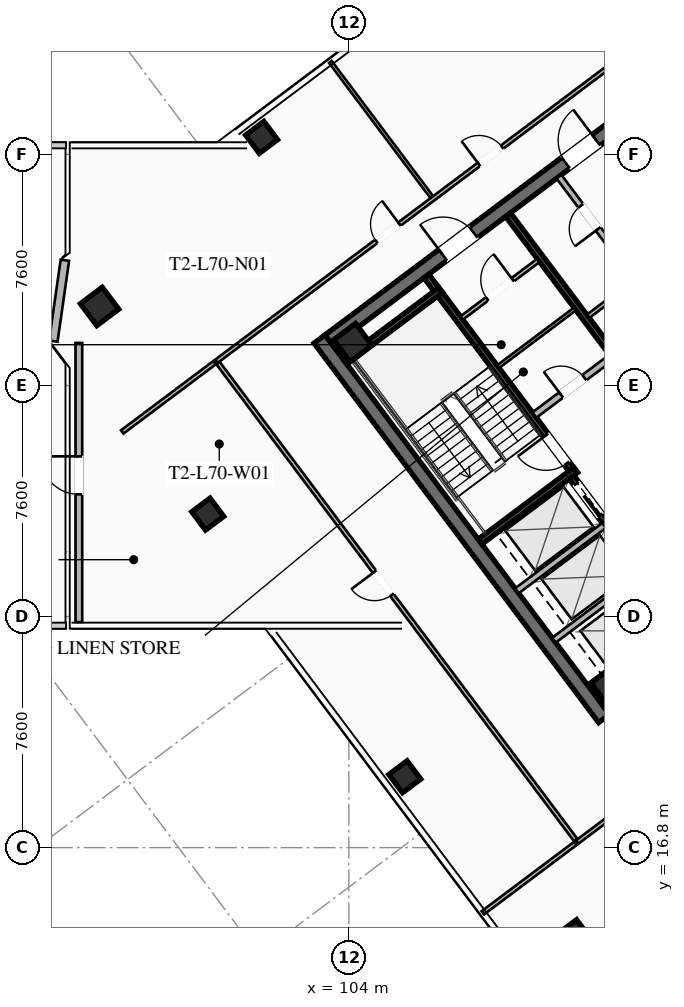
"""IFC4 building model, lengths in metres.
Left out: names, types, materials, properties, quantities, classifications, styles, units other than length and angle.
Written with IfcOpenShell. Run it as: python <this file> out.ifc"""

import sys

from ifc_helpers import new_model, si_unit, direction, frame, frame_2d, origin, origin_2d, place, context, subcontext, project, spatial, rectangle, hollow_rectangle, extrude, element, fill, save


model = new_model("IFC4")
c1 = context("Model", 3, precision=1e-05, world=origin(), true_north=direction((0.0, 1.0)))
c2 = subcontext(c1, "Body", "Model", "MODEL_VIEW")
j1 = project(units=[si_unit("LENGTHUNIT", "METRE"), si_unit("PLANEANGLEUNIT", "RADIAN")], contexts=[c1])
p1 = place(None, origin())
s1 = spatial("IfcSite", under=j1, at=p1, CompositionType="ELEMENT")
p2 = place(p1, origin())
s2 = spatial("IfcBuilding", under=s1, at=p2, CompositionType="ELEMENT")
p3 = place(p2, frame((0.0, 0.0, 259.4)))
s3 = spatial("IfcBuildingStorey", under=s2, at=p3, CompositionType="ELEMENT", Elevation=259.4)
p4 = place(p3, frame((112.396, 21.047, 0.0), z_axis=(0.0, 0.0, 1.0), x_axis=(-0.600005007985, 0.799996243986, 0.0)))
e1 = element("IfcWall", 1, at=p4, inside=s3, PredefinedType="SHEAR", context=c2, shape_type="SweptSolid", body=[
    extrude(rectangle(XDim=15.6, YDim=0.45, at=frame_2d((7.8, 0.0))), origin(), (0.0, 0.0, 1.0), 4.0),
])
p5 = place(p3, frame((124.649, 30.518, 0.0), z_axis=(0.0, 0.0, 1.0), x_axis=(-0.8, -0.6, 0.0)))
e2 = element("IfcWall", 2, at=p5, inside=s3, PredefinedType="SHEAR", context=c2, shape_type="SweptSolid", body=[
    extrude(rectangle(XDim=15.26, YDim=0.45, at=frame_2d((7.63, 0.0))), origin(), (0.0, 0.0, 1.0), 4.0),
])
p6 = place(p5, frame((9.33, 0.0, 0.0)))
e3 = element("IfcOpeningElement", 3, at=p6, cuts=e2, PredefinedType="OPENING", context=c2, shape_type="SweptSolid", body=[
    extrude(rectangle(XDim=1.25, YDim=2.25, at=frame_2d((0.625, 1.125))), frame((0.0, 0.235, 0.0), z_axis=(0.0, -1.0, 0.0), x_axis=(1.0, 0.0, 0.0)), (0.0, 0.0, 1.0), 0.47),
])
p7 = place(p5, frame((4.28, 0.0, 0.0)))
e4 = element("IfcOpeningElement", 4, at=p7, cuts=e2, PredefinedType="OPENING", context=c2, shape_type="SweptSolid", body=[
    extrude(rectangle(XDim=1.25, YDim=2.25, at=frame_2d((0.625, 1.125))), frame((0.0, 0.235, 0.0), z_axis=(0.0, -1.0, 0.0), x_axis=(1.0, 0.0, 0.0)), (0.0, 0.0, 1.0), 0.47),
])
p8 = place(p3, frame((103.351, 33.482, 0.0), z_axis=(0.0, 0.0, 1.0), x_axis=(0.8, 0.6, 0.0)))
e5 = element("IfcWall", 5, at=p8, inside=s3, PredefinedType="SHEAR", context=c2, shape_type="SweptSolid", body=[
    extrude(rectangle(XDim=15.26, YDim=0.45, at=frame_2d((7.63, 0.0))), origin(), (0.0, 0.0, 1.0), 4.0),
])
p9 = place(p8, frame((4.68, 0.0, 0.0)))
e6 = element("IfcOpeningElement", 6, at=p9, cuts=e5, PredefinedType="OPENING", context=c2, shape_type="SweptSolid", body=[
    extrude(rectangle(XDim=1.25, YDim=2.25, at=frame_2d((0.625, 1.125))), frame((0.0, 0.235, 0.0), z_axis=(0.0, -1.0, 0.0), x_axis=(1.0, 0.0, 0.0)), (0.0, 0.0, 1.0), 0.47),
])
p10 = place(p8, frame((9.73, 0.0, 0.0)))
e7 = element("IfcOpeningElement", 7, at=p10, cuts=e5, PredefinedType="OPENING", context=c2, shape_type="SweptSolid", body=[
    extrude(rectangle(XDim=1.25, YDim=2.25, at=frame_2d((0.625, 1.125))), frame((0.0, 0.235, 0.0), z_axis=(0.0, -1.0, 0.0), x_axis=(1.0, 0.0, 0.0)), (0.0, 0.0, 1.0), 0.47),
])
for number, where, z_axis, x_axis in (
    (8, (112.59, 22.13, 0.0), (0.0, 0.0, 1.0), (0.8, 0.6, 0.0)),
    (9, (104.13, 33.41, 0.0), (0.0, 0.0, 1.0), (0.8, 0.6, 0.0)),
    (10, (111.4, 13.8, 0.0), (0.0, 0.0, 1.0), (0.8, 0.6, 0.0)),
    (11, (95.8, 34.6, 0.0), (0.0, 0.0, 1.0), (0.8, 0.6, 0.0)),
):
    element("IfcColumn", number, at=place(p3, frame(where, z_axis=z_axis, x_axis=x_axis)), inside=s3, PredefinedType="COLUMN", context=c2, shape_type="SweptSolid", body=[
        extrude(hollow_rectangle(XDim=0.9, YDim=0.9, WallThickness=0.04, at=origin_2d()), origin(), (0.0, 0.0, 1.0), 3.7),
    ])
for number, where, z_axis, x_axis in (
    (12, (101.13, 40.16, 0.0), (0.0, 0.0, 1.0), (0.8, 0.6, 0.0)),
    (13, (99.36, 27.77, 0.0), (0.0, 0.0, 1.0), (0.8, 0.6, 0.0)),
    (14, (105.84, 19.13, 0.0), (0.0, 0.0, 1.0), (0.8, 0.6, 0.0)),
):
    element("IfcColumn", number, at=place(p3, frame(where, z_axis=z_axis, x_axis=x_axis)), inside=s3, PredefinedType="COLUMN", context=c2, shape_type="SweptSolid", body=[
        extrude(hollow_rectangle(XDim=0.75, YDim=0.75, WallThickness=0.032, at=origin_2d()), origin(), (0.0, 0.0, 1.0), 3.7),
    ])
p11 = place(p3, frame((94.28, 33.46, 0.0), z_axis=(0.0, 0.0, 1.0), x_axis=(0.141370477216, 0.989956760759, 0.0)))
e15 = element("IfcWall", 15, at=p11, inside=s3, PredefinedType="SOLIDWALL", context=c2, shape_type="SweptSolid", body=[
    extrude(rectangle(XDim=2.687, YDim=0.28, at=frame_2d((1.344, 0.0))), origin(), (0.0, 0.0, 1.0), 2.88),
])
p12 = place(p3, frame((95.12, 24.22, 0.0), z_axis=(0.0, 0.0, 1.0), x_axis=(0.0, 1.0, 0.0)))
e16 = element("IfcWall", 16, at=p12, inside=s3, PredefinedType="SOLIDWALL", context=c2, shape_type="SweptSolid", body=[
    extrude(rectangle(XDim=9.18, YDim=0.22, at=frame_2d((4.59, 0.0))), origin(), (0.0, 0.0, 1.0), 2.659),
])
p13 = place(p12, frame((4.2, 0.0, 0.0)))
e17 = element("IfcOpeningElement", 17, at=p13, cuts=e16, PredefinedType="OPENING", context=c2, shape_type="SweptSolid", body=[
    extrude(rectangle(XDim=1.25, YDim=2.25, at=frame_2d((0.625, 1.125))), frame((0.0, 0.12, 0.0), z_axis=(0.0, -1.0, 0.0), x_axis=(1.0, 0.0, 0.0)), (0.0, 0.0, 1.0), 0.24),
])
p14 = place(p3, frame((111.44, 29.08, 0.0), z_axis=(0.0, 0.0, 1.0), x_axis=(-0.59999041401, 0.800007189403, 0.0)))
e18 = element("IfcWall", 18, at=p14, inside=s3, PredefinedType="SHEAR", context=c2, shape_type="SweptSolid", body=[
    extrude(rectangle(XDim=8.15, YDim=0.2, at=frame_2d((4.075, 0.0))), origin(), (0.0, 0.0, 1.0), 3.7),
])
p15 = place(p14, frame((0.45, 0.0, 0.0)))
e19 = element("IfcOpeningElement", 19, at=p15, cuts=e18, PredefinedType="OPENING", context=c2, shape_type="SweptSolid", body=[
    extrude(rectangle(XDim=1.15, YDim=2.2, at=frame_2d((0.575, 1.1))), frame((0.0, 0.11, 0.0), z_axis=(0.0, -1.0, 0.0), x_axis=(1.0, 0.0, 0.0)), (0.0, 0.0, 1.0), 0.22),
])
for number, where, z_axis, x_axis in (
    (20, (108.316, 26.862, 0.0), (0.0, 0.0, 1.0), (0.8, 0.6, 0.0)),
    (21, (103.876, 32.782, 0.0), (0.0, 0.0, 1.0), (0.8, 0.6, 0.0)),
):
    element("IfcWall", number, at=place(p3, frame(where, z_axis=z_axis, x_axis=x_axis)), inside=s3, PredefinedType="SHEAR", context=c2, shape_type="SweptSolid", body=[
        extrude(rectangle(XDim=3.93, YDim=0.2, at=frame_2d((1.965, 0.0))), origin(), (0.0, 0.0, 1.0), 3.7),
    ])
p16 = place(p3, frame((118.058, 25.856, 0.0), z_axis=(0.0, 0.0, 1.0), x_axis=(-0.600002657301, 0.799998007018, 0.0)))
e22 = element("IfcWall", 22, at=p16, inside=s3, PredefinedType="SHEAR", context=c2, shape_type="SweptSolid", body=[
    extrude(rectangle(XDim=14.7, YDim=0.2, at=frame_2d((7.35, 0.0))), origin(), (0.0, 0.0, 1.0), 3.7),
])
p17 = place(p3, frame((110.104, 31.028, 0.0), z_axis=(0.0, 0.0, 1.0), x_axis=(0.800018601094, 0.59997519774, 0.0)))
e23 = element("IfcWall", 23, at=p17, inside=s3, PredefinedType="SOLIDWALL", context=c2, shape_type="SweptSolid", body=[
    extrude(rectangle(XDim=3.15, YDim=0.22, at=frame_2d((1.575, 0.0))), origin(), (0.0, 0.0, 1.0), 2.659),
])
p18 = place(p17, frame((1.1, 0.0, 0.0)))
e24 = element("IfcOpeningElement", 24, at=p18, cuts=e23, PredefinedType="OPENING", context=c2, shape_type="SweptSolid", body=[
    extrude(rectangle(XDim=0.95, YDim=2.05, at=frame_2d((0.475, 1.025))), frame((0.0, 0.12, 0.0), z_axis=(0.0, -1.0, 0.0), x_axis=(1.0, 0.0, 0.0)), (0.0, 0.0, 1.0), 0.24),
])
p19 = place(p3, frame((115.25, 23.75, 0.0), z_axis=(0.0, 0.0, 1.0), x_axis=(-0.599994036198, 0.800004472816, 0.0)))
e25 = element("IfcWall", 25, at=p19, inside=s3, PredefinedType="SHEAR", context=c2, shape_type="SweptSolid", body=[
    extrude(rectangle(XDim=6.55, YDim=0.2, at=frame_2d((3.275, 0.0))), origin(), (0.0, 0.0, 1.0), 3.7),
])
p20 = place(p19, frame((4.975, 0.0, 0.0)))
e26 = element("IfcOpeningElement", 26, at=p20, cuts=e25, PredefinedType="OPENING", context=c2, shape_type="SweptSolid", body=[
    extrude(rectangle(XDim=1.3, YDim=2.25, at=frame_2d((0.65, 1.125))), frame((0.0, 0.11, 0.0), z_axis=(0.0, -1.0, 0.0), x_axis=(1.0, 0.0, 0.0)), (0.0, 0.0, 1.0), 0.22),
])
p21 = place(p19, frame((2.975, 0.0, 0.0)))
e27 = element("IfcOpeningElement", 27, at=p21, cuts=e25, PredefinedType="OPENING", context=c2, shape_type="SweptSolid", body=[
    extrude(rectangle(XDim=1.3, YDim=2.25, at=frame_2d((0.65, 1.125))), frame((0.0, 0.11, 0.0), z_axis=(0.0, -1.0, 0.0), x_axis=(1.0, 0.0, 0.0)), (0.0, 0.0, 1.0), 0.22),
])
p22 = place(p19, frame((0.775, 0.0, 0.0)))
e28 = element("IfcOpeningElement", 28, at=p22, cuts=e25, PredefinedType="OPENING", context=c2, shape_type="SweptSolid", body=[
    extrude(rectangle(XDim=1.3, YDim=2.25, at=frame_2d((0.65, 1.125))), frame((0.0, 0.11, 0.0), z_axis=(0.0, -1.0, 0.0), x_axis=(1.0, 0.0, 0.0)), (0.0, 0.0, 1.0), 0.22),
])
for number, where, z_axis, x_axis in (
    (29, (110.746, 23.622, 0.0), (0.0, 0.0, 1.0), (0.8, 0.6, 0.0)),
    (30, (109.528, 25.246, 0.0), (0.0, 0.0, 1.0), (0.8, 0.6, 0.0)),
):
    element("IfcWall", number, at=place(p3, frame(where, z_axis=z_axis, x_axis=x_axis)), inside=s3, PredefinedType="SOLIDWALL", context=c2, shape_type="SweptSolid", body=[
        extrude(rectangle(XDim=3.58, YDim=0.2, at=frame_2d((1.79, 0.0))), origin(), (0.0, 0.0, 1.0), 3.7),
    ])
p23 = place(p3, frame((107.71, 34.22, 0.0), z_axis=(0.0, 0.0, 1.0), x_axis=(0.799981399002, 0.60002480053, 0.0)))
e31 = element("IfcWall", 31, at=p23, inside=s3, PredefinedType="PARTITIONING", context=c2, shape_type="SweptSolid", body=[
    extrude(rectangle(XDim=3.15, YDim=0.135, at=frame_2d((1.575, 0.0))), origin(), (0.0, 0.0, 1.0), 2.659),
])
p24 = place(p23, frame((1.05, 0.0, 0.0)))
e32 = element("IfcOpeningElement", 32, at=p24, cuts=e31, PredefinedType="OPENING", context=c2, shape_type="SweptSolid", body=[
    extrude(rectangle(XDim=1.05, YDim=2.2, at=frame_2d((0.525, 1.1))), frame((0.0, 0.077, 0.0), z_axis=(0.0, -1.0, 0.0), x_axis=(1.0, 0.0, 0.0)), (0.0, 0.0, 1.0), 0.155),
])
p25 = place(p3, frame((108.91, 32.62, 0.0), z_axis=(0.0, 0.0, 1.0), x_axis=(0.800018601094, 0.59997519774, 0.0)))
e33 = element("IfcWall", 33, at=p25, inside=s3, PredefinedType="PARTITIONING", context=c2, shape_type="SweptSolid", body=[
    extrude(rectangle(XDim=3.15, YDim=0.11, at=frame_2d((1.575, 0.0))), origin(), (0.0, 0.0, 1.0), 2.659),
])
p26 = place(p3, frame((115.11, 33.27, 0.0), z_axis=(0.0, 0.0, 1.0), x_axis=(-0.600011160345, 0.79999162962, 0.0)))
e34 = element("IfcWall", 34, at=p26, inside=s3, PredefinedType="SOLIDWALL", context=c2, shape_type="SweptSolid", body=[
    extrude(rectangle(XDim=7.0, YDim=0.2, at=frame_2d((3.5, 0.0))), origin(), (0.0, 0.0, 1.0), 2.659),
])
p27 = place(p26, frame((0.85, 0.0, 0.0)))
e35 = element("IfcOpeningElement", 35, at=p27, cuts=e34, PredefinedType="OPENING", context=c2, shape_type="SweptSolid", body=[
    extrude(rectangle(XDim=0.95, YDim=2.05, at=frame_2d((0.475, 1.025))), frame((0.0, 0.11, 0.0), z_axis=(0.0, -1.0, 0.0), x_axis=(1.0, 0.0, 0.0)), (0.0, 0.0, 1.0), 0.22),
])
p28 = place(p26, frame((4.85, 0.0, 0.0)))
e36 = element("IfcOpeningElement", 36, at=p28, cuts=e34, PredefinedType="OPENING", context=c2, shape_type="SweptSolid", body=[
    extrude(rectangle(XDim=0.95, YDim=2.05, at=frame_2d((0.475, 1.025))), frame((0.0, 0.11, 0.0), z_axis=(0.0, -1.0, 0.0), x_axis=(1.0, 0.0, 0.0)), (0.0, 0.0, 1.0), 0.22),
])
p29 = place(p3, frame((111.876, 34.282, 0.0), z_axis=(0.0, 0.0, 1.0), x_axis=(0.8, 0.6, 0.0)))
e37 = element("IfcWall", 37, at=p29, inside=s3, PredefinedType="PARTITIONING", context=c2, shape_type="SweptSolid", body=[
    extrude(rectangle(XDim=1.88, YDim=0.135, at=frame_2d((0.94, 0.0))), origin(), (0.0, 0.0, 1.0), 2.659),
])
p30 = place(p3, frame((99.65, 32.8, 0.0), z_axis=(0.0, 0.0, 1.0), x_axis=(0.8, 0.6, 0.0)))
e38 = element("IfcWall", 38, at=p30, inside=s3, PredefinedType="PARTITIONING", context=c2, shape_type="SweptSolid", body=[
    extrude(rectangle(XDim=23.85, YDim=0.135, at=frame_2d((11.925, 0.0))), origin(), (0.0, 0.0, 1.0), 2.659),
])
p31 = place(p30, frame((6.567, 0.0, 0.0)))
e39 = element("IfcOpeningElement", 39, at=p31, cuts=e38, PredefinedType="OPENING", context=c2, shape_type="SweptSolid", body=[
    extrude(rectangle(XDim=0.95, YDim=2.05, at=frame_2d((0.475, 1.025))), frame((0.0, 0.077, 0.0), z_axis=(0.0, -1.0, 0.0), x_axis=(1.0, 0.0, 0.0)), (0.0, 0.0, 1.0), 0.155),
])
p32 = place(p30, frame((10.788, 0.0, 0.0)))
e40 = element("IfcOpeningElement", 40, at=p32, cuts=e38, PredefinedType="OPENING", context=c2, shape_type="SweptSolid", body=[
    extrude(rectangle(XDim=0.95, YDim=2.05, at=frame_2d((0.475, 1.025))), frame((0.0, 0.077, 0.0), z_axis=(0.0, -1.0, 0.0), x_axis=(1.0, 0.0, 0.0)), (0.0, 0.0, 1.0), 0.155),
])
p33 = place(p3, frame((106.722, 38.204, 0.0), z_axis=(0.0, 0.0, 1.0), x_axis=(-0.599985922959, 0.800010557587, 0.0)))
e41 = element("IfcWall", 41, at=p33, inside=s3, PredefinedType="PARTITIONING", context=c2, shape_type="SweptSolid", body=[
    extrude(rectangle(XDim=5.55, YDim=0.11, at=frame_2d((2.775, 0.0))), origin(), (0.0, 0.0, 1.0), 2.659),
])
p34 = place(p3, frame((123.832, 26.224, 0.0), z_axis=(0.0, 0.0, 1.0), x_axis=(-0.799994292853, -0.600007609454, 0.0)))
e42 = element("IfcWall", 42, at=p34, inside=s3, PredefinedType="PARTITIONING", context=c2, shape_type="SweptSolid", body=[
    extrude(rectangle(XDim=15.4, YDim=0.135, at=frame_2d((7.7, 0.0))), origin(), (0.0, 0.0, 1.0), 2.659),
])
p35 = place(p34, frame((3.676, 0.0, 0.0)))
e43 = element("IfcOpeningElement", 43, at=p35, cuts=e42, PredefinedType="OPENING", context=c2, shape_type="SweptSolid", body=[
    extrude(rectangle(XDim=0.95, YDim=2.05, at=frame_2d((0.475, 1.025))), frame((0.0, 0.077, 0.0), z_axis=(0.0, -1.0, 0.0), x_axis=(1.0, 0.0, 0.0)), (0.0, 0.0, 1.0), 0.155),
])
p36 = place(p3, frame((111.464, 17.048, 0.0), z_axis=(0.0, 0.0, 1.0), x_axis=(-0.600003983917, 0.799997012046, 0.0)))
e44 = element("IfcWall", 44, at=p36, inside=s3, PredefinedType="PARTITIONING", context=c2, shape_type="SweptSolid", body=[
    extrude(rectangle(XDim=19.61, YDim=0.135, at=frame_2d((9.805, 0.0))), origin(), (0.0, 0.0, 1.0), 2.659),
])
p37 = place(p36, frame((10.083, 0.0, 0.0)))
e45 = element("IfcOpeningElement", 45, at=p37, cuts=e44, PredefinedType="OPENING", context=c2, shape_type="SweptSolid", body=[
    extrude(rectangle(XDim=0.95, YDim=2.05, at=frame_2d((0.475, 1.025))), frame((0.0, 0.077, 0.0), z_axis=(0.0, -1.0, 0.0), x_axis=(1.0, 0.0, 0.0)), (0.0, 0.0, 1.0), 0.155),
])
for number, where, z_axis, x_axis in (
    (46, (99.586, 32.752, 0.0), (0.0, 0.0, 1.0), (-0.8, -0.6, 0.0)),
    (47, (108.408, 14.656, 0.0), (0.0, 0.0, 1.0), (0.8, 0.6, 0.0)),
):
    element("IfcWall", number, at=place(p3, frame(where, z_axis=z_axis, x_axis=x_axis)), inside=s3, PredefinedType="PARTITIONING", context=c2, shape_type="SweptSolid", body=[
        extrude(rectangle(XDim=3.8, YDim=0.135, at=frame_2d((1.9, 0.0))), origin(), (0.0, 0.0, 1.0), 2.659),
    ])
p38 = place(p13, origin())
e48 = element("IfcDoor", 48, at=p38, inside=s3, OperationType="SINGLE_SWING_RIGHT", PredefinedType="DOOR", context=c2, shape_type="SweptSolid", body=[
    extrude(rectangle(XDim=1.25, YDim=2.25, at=frame_2d((0.625, 1.125))), frame((0.0, 0.025, 0.0), z_axis=(0.0, -1.0, 0.0), x_axis=(1.0, 0.0, 0.0)), (0.0, 0.0, 1.0), 0.05),
])
fill(e17, e48)
p39 = place(p9, origin())
e49 = element("IfcDoor", 49, at=p39, inside=s3, OperationType="SINGLE_SWING_LEFT", PredefinedType="DOOR", context=c2, shape_type="SweptSolid", body=[
    extrude(rectangle(XDim=1.25, YDim=2.25, at=frame_2d((0.625, 1.125))), frame((0.0, 0.025, 0.0), z_axis=(0.0, -1.0, 0.0), x_axis=(1.0, 0.0, 0.0)), (0.0, 0.0, 1.0), 0.05),
])
fill(e6, e49)
p40 = place(p10, origin())
e50 = element("IfcDoor", 50, at=p40, inside=s3, OperationType="SINGLE_SWING_RIGHT", PredefinedType="DOOR", context=c2, shape_type="SweptSolid", body=[
    extrude(rectangle(XDim=1.25, YDim=2.25, at=frame_2d((0.625, 1.125))), frame((0.0, 0.025, 0.0), z_axis=(0.0, -1.0, 0.0), x_axis=(1.0, 0.0, 0.0)), (0.0, 0.0, 1.0), 0.05),
])
fill(e7, e50)
p41 = place(p15, origin())
e51 = element("IfcDoor", 51, at=p41, inside=s3, OperationType="SINGLE_SWING_RIGHT", PredefinedType="DOOR", context=c2, shape_type="SweptSolid", body=[
    extrude(rectangle(XDim=1.15, YDim=2.2, at=frame_2d((0.575, 1.1))), frame((0.0, 0.025, 0.0), z_axis=(0.0, -1.0, 0.0), x_axis=(1.0, 0.0, 0.0)), (0.0, 0.0, 1.0), 0.05),
])
fill(e19, e51)
p42 = place(p24, origin())
e52 = element("IfcDoor", 52, at=p42, inside=s3, OperationType="SINGLE_SWING_RIGHT", PredefinedType="DOOR", context=c2, shape_type="SweptSolid", body=[
    extrude(rectangle(XDim=1.05, YDim=2.2, at=frame_2d((0.525, 1.1))), frame((0.0, 0.025, 0.0), z_axis=(0.0, -1.0, 0.0), x_axis=(1.0, 0.0, 0.0)), (0.0, 0.0, 1.0), 0.05),
])
fill(e32, e52)
p43 = place(p18, origin())
e53 = element("IfcDoor", 53, at=p43, inside=s3, OperationType="SINGLE_SWING_LEFT", PredefinedType="DOOR", context=c2, shape_type="SweptSolid", body=[
    extrude(rectangle(XDim=0.95, YDim=2.05, at=frame_2d((0.475, 1.025))), frame((0.0, 0.025, 0.0), z_axis=(0.0, -1.0, 0.0), x_axis=(1.0, 0.0, 0.0)), (0.0, 0.0, 1.0), 0.05),
])
fill(e24, e53)
p44 = place(p28, origin())
e54 = element("IfcDoor", 54, at=p44, inside=s3, OperationType="SINGLE_SWING_LEFT", PredefinedType="DOOR", context=c2, shape_type="SweptSolid", body=[
    extrude(rectangle(XDim=0.95, YDim=2.05, at=frame_2d((0.475, 1.025))), frame((0.0, 0.025, 0.0), z_axis=(0.0, -1.0, 0.0), x_axis=(1.0, 0.0, 0.0)), (0.0, 0.0, 1.0), 0.05),
])
fill(e36, e54)
p45 = place(p31, origin())
e55 = element("IfcDoor", 55, at=p45, inside=s3, OperationType="SINGLE_SWING_RIGHT", PredefinedType="DOOR", context=c2, shape_type="SweptSolid", body=[
    extrude(rectangle(XDim=0.95, YDim=2.05, at=frame_2d((0.475, 1.025))), frame((0.0, 0.025, 0.0), z_axis=(0.0, -1.0, 0.0), x_axis=(1.0, 0.0, 0.0)), (0.0, 0.0, 1.0), 0.05),
])
fill(e39, e55)
p46 = place(p32, origin())
e56 = element("IfcDoor", 56, at=p46, inside=s3, OperationType="SINGLE_SWING_LEFT", PredefinedType="DOOR", context=c2, shape_type="SweptSolid", body=[
    extrude(rectangle(XDim=0.95, YDim=2.05, at=frame_2d((0.475, 1.025))), frame((0.0, 0.025, 0.0), z_axis=(0.0, -1.0, 0.0), x_axis=(1.0, 0.0, 0.0)), (0.0, 0.0, 1.0), 0.05),
])
fill(e40, e56)
p47 = place(p37, origin())
e57 = element("IfcDoor", 57, at=p47, inside=s3, OperationType="SINGLE_SWING_RIGHT", PredefinedType="DOOR", context=c2, shape_type="SweptSolid", body=[
    extrude(rectangle(XDim=0.95, YDim=2.05, at=frame_2d((0.475, 1.025))), frame((0.0, 0.025, 0.0), z_axis=(0.0, -1.0, 0.0), x_axis=(1.0, 0.0, 0.0)), (0.0, 0.0, 1.0), 0.05),
])
fill(e45, e57)
p48 = place(p20, origin())
e58 = element("IfcDoor", 58, at=p48, inside=s3, OperationType="SLIDING_TO_LEFT", PredefinedType="DOOR", context=c2, shape_type="SweptSolid", body=[
    extrude(rectangle(XDim=1.3, YDim=2.25, at=frame_2d((0.65, 1.125))), frame((0.0, 0.025, 0.0), z_axis=(0.0, -1.0, 0.0), x_axis=(1.0, 0.0, 0.0)), (0.0, 0.0, 1.0), 0.05),
])
fill(e26, e58)
save(model, sys.argv[1])
